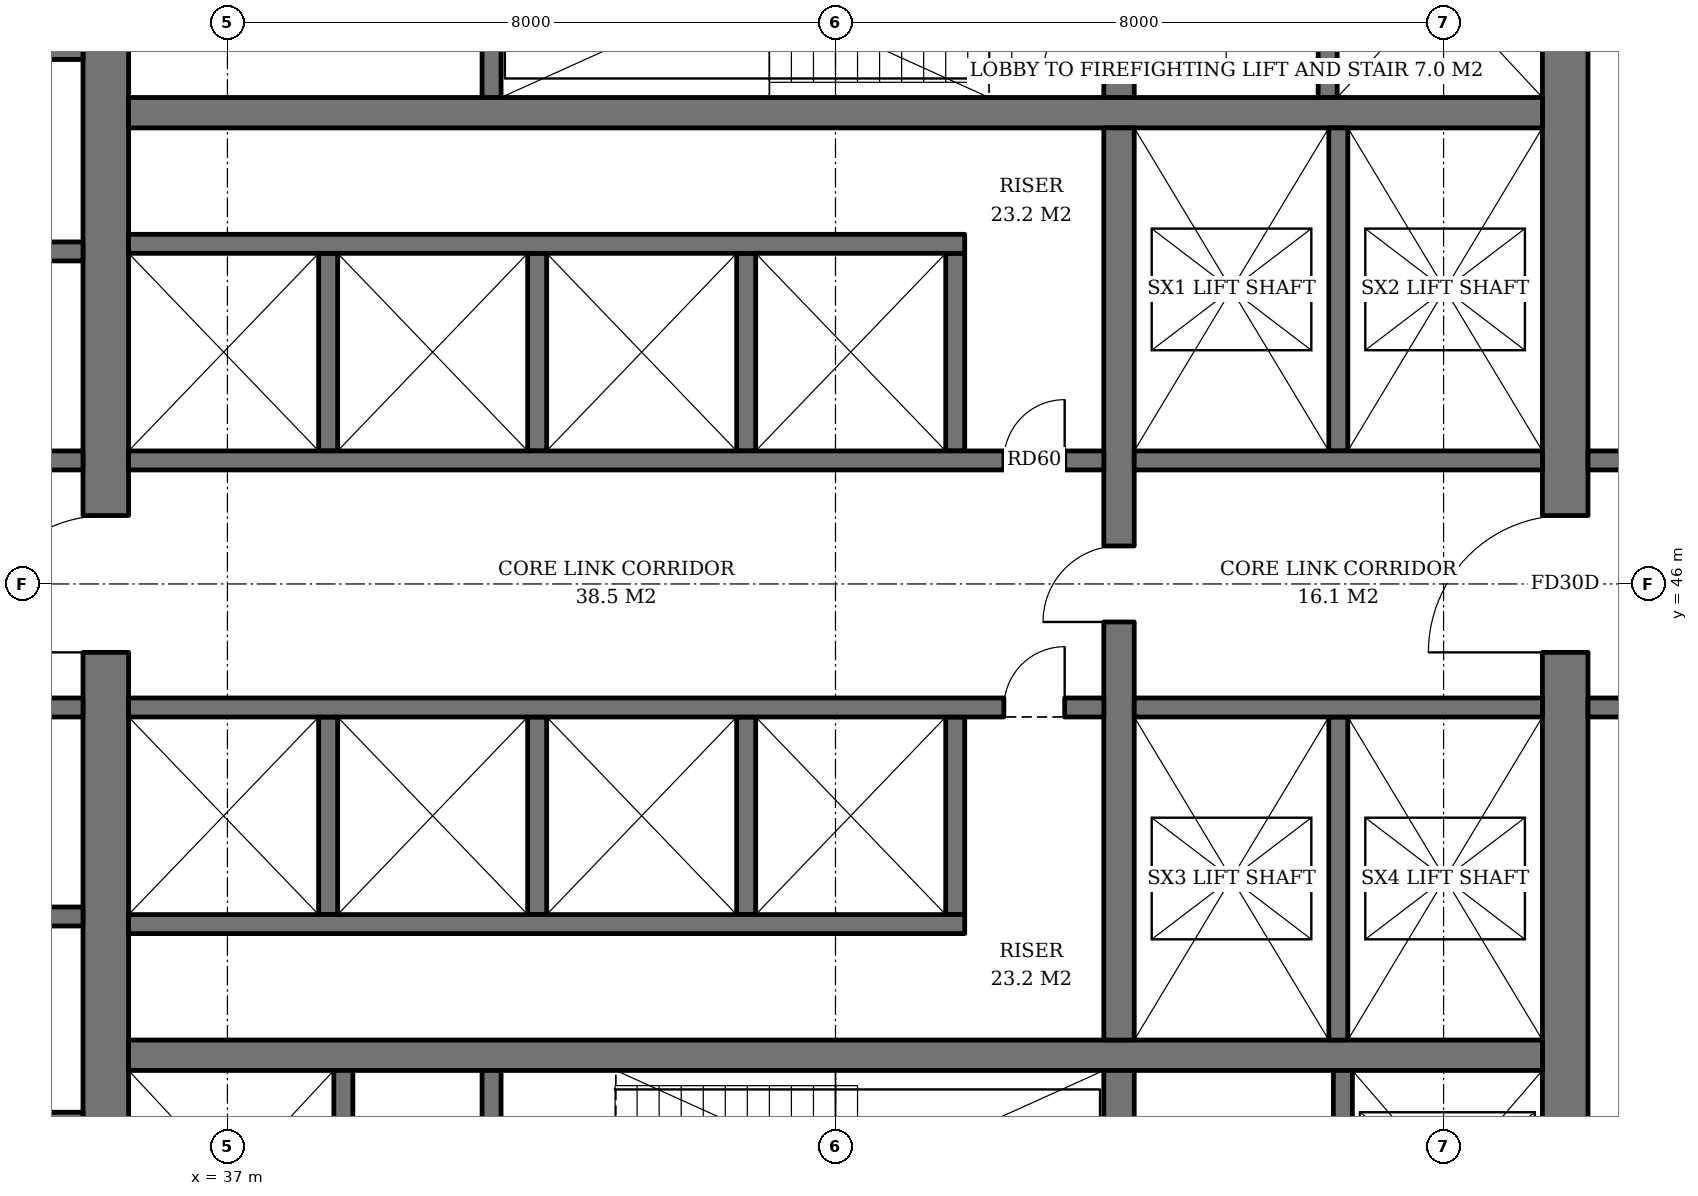
"""IFC4 building model, lengths in metres.
Left out: names, types, materials, properties, quantities, classifications, styles, units other than length and angle.
Written with IfcOpenShell. Run it as: python <this file> out.ifc"""

import sys

from ifc_helpers import new_model, si_unit, direction, frame, frame_2d, origin, place, context, subcontext, project, spatial, rectangle, extrude, element, fill, save


model = new_model("IFC4")
c1 = context("Model", 3, precision=1e-05, world=origin(), true_north=direction((0.0, 1.0)))
c2 = subcontext(c1, "Body", "Model", "MODEL_VIEW")
j1 = project(units=[si_unit("LENGTHUNIT", "METRE"), si_unit("PLANEANGLEUNIT", "RADIAN")], contexts=[c1])
p1 = place(None, origin())
s1 = spatial("IfcSite", under=j1, at=p1, CompositionType="ELEMENT")
p2 = place(p1, origin())
s2 = spatial("IfcBuilding", under=s1, at=p2, CompositionType="ELEMENT")
p3 = place(p2, frame((0.0, 0.0, 157.8)))
s3 = spatial("IfcBuildingStorey", under=s2, at=p3, CompositionType="ELEMENT", Elevation=157.8)
p4 = place(p3, frame((35.4, 36.7, 0.0), z_axis=(0.0, 0.0, 1.0), x_axis=(0.0, 1.0, 0.0)))
e1 = element("IfcWall", 1, at=p4, inside=s3, PredefinedType="SHEAR", context=c2, shape_type="SweptSolid", body=[
    extrude(rectangle(XDim=18.6, YDim=0.6, at=frame_2d((9.3, 0.0))), origin(), (0.0, 0.0, 1.0), 3.8),
])
p5 = place(p4, frame((8.4, 0.0, 0.0)))
e2 = element("IfcOpeningElement", 2, at=p5, cuts=e1, PredefinedType="OPENING", context=c2, shape_type="SweptSolid", body=[
    extrude(rectangle(XDim=1.8, YDim=2.4, at=frame_2d((0.9, 1.2))), frame((0.0, 0.31, 0.0), z_axis=(0.0, -1.0, 0.0), x_axis=(1.0, 0.0, 0.0)), (0.0, 0.0, 1.0), 0.62),
])
p6 = place(p3, frame((54.6, 36.7, 0.0), z_axis=(0.0, 0.0, 1.0), x_axis=(0.0, 1.0, 0.0)))
e3 = element("IfcWall", 3, at=p6, inside=s3, PredefinedType="SHEAR", context=c2, shape_type="SweptSolid", body=[
    extrude(rectangle(XDim=18.6, YDim=0.6, at=frame_2d((9.3, 0.0))), origin(), (0.0, 0.0, 1.0), 3.8),
])
p7 = place(p6, frame((8.4, 0.0, 0.0)))
e4 = element("IfcOpeningElement", 4, at=p7, cuts=e3, PredefinedType="OPENING", context=c2, shape_type="SweptSolid", body=[
    extrude(rectangle(XDim=1.8, YDim=2.4, at=frame_2d((0.9, 1.2))), frame((0.0, 0.31, 0.0), z_axis=(0.0, -1.0, 0.0), x_axis=(1.0, 0.0, 0.0)), (0.0, 0.0, 1.0), 0.62),
])
for number, where, z_axis, x_axis in (
    (5, (35.7, 39.8, 0.0), (0.0, 0.0, 1.0), (1.0, 0.0, 0.0)),
    (6, (35.7, 52.2, 0.0), (0.0, 0.0, 1.0), (1.0, 0.0, 0.0)),
):
    element("IfcWall", number, at=place(p3, frame(where, z_axis=z_axis, x_axis=x_axis)), inside=s3, PredefinedType="SHEAR", context=c2, shape_type="SweptSolid", body=[
        extrude(rectangle(XDim=18.6, YDim=0.4, at=frame_2d((9.3, 0.0))), origin(), (0.0, 0.0, 1.0), 3.8),
    ])
p8 = place(p3, frame((48.73, 36.7, 0.0), z_axis=(0.0, 0.0, 1.0), x_axis=(0.0, 1.0, 0.0)))
e7 = element("IfcWall", 7, at=p8, inside=s3, PredefinedType="SHEAR", context=c2, shape_type="SweptSolid", body=[
    extrude(rectangle(XDim=2.9, YDim=0.4, at=frame_2d((1.45, 0.0))), origin(), (0.0, 0.0, 1.0), 3.8),
])
p9 = place(p3, frame((48.73, 40.0, 0.0), z_axis=(0.0, 0.0, 1.0), x_axis=(0.0, 1.0, 0.0)))
e8 = element("IfcWall", 8, at=p9, inside=s3, PredefinedType="SHEAR", context=c2, shape_type="SweptSolid", body=[
    extrude(rectangle(XDim=12.0, YDim=0.4, at=frame_2d((6.0, 0.0))), origin(), (0.0, 0.0, 1.0), 3.8),
])
p10 = place(p9, frame((5.5, 0.0, 0.0)))
e9 = element("IfcOpeningElement", 9, at=p10, cuts=e8, PredefinedType="OPENING", context=c2, shape_type="SweptSolid", body=[
    extrude(rectangle(XDim=1.0, YDim=2.1, at=frame_2d((0.5, 1.05))), frame((0.0, 0.21, 0.0), z_axis=(0.0, -1.0, 0.0), x_axis=(1.0, 0.0, 0.0)), (0.0, 0.0, 1.0), 0.42),
])
p11 = place(p3, frame((48.73, 52.4, 0.0), z_axis=(0.0, 0.0, 1.0), x_axis=(0.0, 1.0, 0.0)))
e10 = element("IfcWall", 10, at=p11, inside=s3, PredefinedType="SHEAR", context=c2, shape_type="SweptSolid", body=[
    extrude(rectangle(XDim=2.9, YDim=0.4, at=frame_2d((1.45, 0.0))), origin(), (0.0, 0.0, 1.0), 3.8),
])
p12 = place(p11, frame((0.3, 0.0, 0.0)))
e11 = element("IfcOpeningElement", 11, at=p12, cuts=e10, PredefinedType="OPENING", context=c2, shape_type="SweptSolid", body=[
    extrude(rectangle(XDim=1.0, YDim=2.1, at=frame_2d((0.5, 1.05))), frame((0.0, 0.21, 0.0), z_axis=(0.0, -1.0, 0.0), x_axis=(1.0, 0.0, 0.0)), (0.0, 0.0, 1.0), 0.42),
])
p13 = place(p3, frame((38.525, 36.7, 0.0), z_axis=(0.0, 0.0, 1.0), x_axis=(0.0, 1.0, 0.0)))
e12 = element("IfcWall", 12, at=p13, inside=s3, PredefinedType="SHEAR", context=c2, shape_type="SweptSolid", body=[
    extrude(rectangle(XDim=2.9, YDim=0.25, at=frame_2d((1.45, 0.0))), origin(), (0.0, 0.0, 1.0), 3.8),
])
p14 = place(p13, frame((0.8, 0.0, 0.0)))
e13 = element("IfcOpeningElement", 13, at=p14, cuts=e12, PredefinedType="OPENING", context=c2, shape_type="SweptSolid", body=[
    extrude(rectangle(XDim=1.3, YDim=2.2, at=frame_2d((0.65, 1.1))), frame((0.0, 0.135, 0.0), z_axis=(0.0, -1.0, 0.0), x_axis=(1.0, 0.0, 0.0)), (0.0, 0.0, 1.0), 0.27),
])
p15 = place(p3, frame((40.475, 36.7, 0.0), z_axis=(0.0, 0.0, 1.0), x_axis=(0.0, 1.0, 0.0)))
e14 = element("IfcWall", 14, at=p15, inside=s3, PredefinedType="SHEAR", context=c2, shape_type="SweptSolid", body=[
    extrude(rectangle(XDim=2.9, YDim=0.25, at=frame_2d((1.45, 0.0))), origin(), (0.0, 0.0, 1.0), 3.8),
])
p16 = place(p15, frame((0.75, 0.0, 0.0)))
e15 = element("IfcOpeningElement", 15, at=p16, cuts=e14, PredefinedType="OPENING", context=c2, shape_type="SweptSolid", body=[
    extrude(rectangle(XDim=1.2, YDim=2.1, at=frame_2d((0.6, 1.05))), frame((0.0, 0.135, 0.0), z_axis=(0.0, -1.0, 0.0), x_axis=(1.0, 0.0, 0.0)), (0.0, 0.0, 1.0), 0.27),
])
p17 = place(p3, frame((51.675, 36.7, 0.0), z_axis=(0.0, 0.0, 1.0), x_axis=(0.0, 1.0, 0.0)))
e16 = element("IfcWall", 16, at=p17, inside=s3, PredefinedType="SHEAR", context=c2, shape_type="SweptSolid", body=[
    extrude(rectangle(XDim=2.9, YDim=0.25, at=frame_2d((1.45, 0.0))), origin(), (0.0, 0.0, 1.0), 3.8),
])
p18 = place(p17, frame((0.75, 0.0, 0.0)))
e17 = element("IfcOpeningElement", 17, at=p18, cuts=e16, PredefinedType="OPENING", context=c2, shape_type="SweptSolid", body=[
    extrude(rectangle(XDim=1.4, YDim=2.4, at=frame_2d((0.7, 1.2))), frame((0.0, 0.135, 0.0), z_axis=(0.0, -1.0, 0.0), x_axis=(1.0, 0.0, 0.0)), (0.0, 0.0, 1.0), 0.27),
])
p19 = place(p3, frame((40.475, 52.4, 0.0), z_axis=(0.0, 0.0, 1.0), x_axis=(0.0, 1.0, 0.0)))
e18 = element("IfcWall", 18, at=p19, inside=s3, PredefinedType="SHEAR", context=c2, shape_type="SweptSolid", body=[
    extrude(rectangle(XDim=2.9, YDim=0.25, at=frame_2d((1.45, 0.0))), origin(), (0.0, 0.0, 1.0), 3.8),
])
p20 = place(p3, frame((51.475, 52.4, 0.0), z_axis=(0.0, 0.0, 1.0), x_axis=(0.0, 1.0, 0.0)))
e19 = element("IfcWall", 19, at=p20, inside=s3, PredefinedType="SHEAR", context=c2, shape_type="SweptSolid", body=[
    extrude(rectangle(XDim=2.9, YDim=0.25, at=frame_2d((1.45, 0.0))), origin(), (0.0, 0.0, 1.0), 3.8),
])
p21 = place(p20, frame((0.8, 0.0, 0.0)))
e20 = element("IfcOpeningElement", 20, at=p21, cuts=e19, PredefinedType="OPENING", context=c2, shape_type="SweptSolid", body=[
    extrude(rectangle(XDim=1.3, YDim=2.2, at=frame_2d((0.65, 1.1))), frame((0.0, 0.135, 0.0), z_axis=(0.0, -1.0, 0.0), x_axis=(1.0, 0.0, 0.0)), (0.0, 0.0, 1.0), 0.27),
])
for number, where, z_axis, x_axis in (
    (21, (38.325, 47.75, 0.0), (0.0, 0.0, 1.0), (0.0, 1.0, 0.0)),
    (22, (41.075, 47.75, 0.0), (0.0, 0.0, 1.0), (0.0, 1.0, 0.0)),
    (23, (43.825, 47.75, 0.0), (0.0, 0.0, 1.0), (0.0, 1.0, 0.0)),
    (24, (46.575, 47.75, 0.0), (0.0, 0.0, 1.0), (0.0, 1.0, 0.0)),
):
    element("IfcWall", number, at=place(p3, frame(where, z_axis=z_axis, x_axis=x_axis)), inside=s3, PredefinedType="SHEAR", context=c2, shape_type="SweptSolid", body=[
        extrude(rectangle(XDim=2.6, YDim=0.25, at=frame_2d((1.3, 0.0))), origin(), (0.0, 0.0, 1.0), 3.8),
    ])
p22 = place(p3, frame((35.7, 50.475, 0.0), z_axis=(0.0, 0.0, 1.0), x_axis=(1.0, 0.0, 0.0)))
e25 = element("IfcWall", 25, at=p22, inside=s3, PredefinedType="SHEAR", context=c2, shape_type="SweptSolid", body=[
    extrude(rectangle(XDim=11.0, YDim=0.25, at=frame_2d((5.5, 0.0))), origin(), (0.0, 0.0, 1.0), 3.8),
])
p23 = place(p3, frame((35.7, 47.625, 0.0), z_axis=(0.0, 0.0, 1.0), x_axis=(1.0, 0.0, 0.0)))
e26 = element("IfcWall", 26, at=p23, inside=s3, PredefinedType="SHEAR", context=c2, shape_type="SweptSolid", body=[
    extrude(rectangle(XDim=12.83, YDim=0.25, at=frame_2d((6.415, 0.0))), origin(), (0.0, 0.0, 1.0), 3.8),
])
p24 = place(p23, frame((11.515, 0.0, 0.0)))
e27 = element("IfcOpeningElement", 27, at=p24, cuts=e26, PredefinedType="OPENING", context=c2, shape_type="SweptSolid", body=[
    extrude(rectangle(XDim=0.8, YDim=2.0, at=frame_2d((0.4, 1.0))), frame((0.0, 0.135, 0.0), z_axis=(0.0, -1.0, 0.0), x_axis=(1.0, 0.0, 0.0)), (0.0, 0.0, 1.0), 0.27),
])
for number, where, z_axis, x_axis in (
    (28, (38.325, 44.25, 0.0), (0.0, 0.0, 1.0), (0.0, -1.0, 0.0)),
    (29, (41.075, 44.25, 0.0), (0.0, 0.0, 1.0), (0.0, -1.0, 0.0)),
    (30, (43.825, 44.25, 0.0), (0.0, 0.0, 1.0), (0.0, -1.0, 0.0)),
    (31, (46.575, 44.25, 0.0), (0.0, 0.0, 1.0), (0.0, -1.0, 0.0)),
):
    element("IfcWall", number, at=place(p3, frame(where, z_axis=z_axis, x_axis=x_axis)), inside=s3, PredefinedType="SHEAR", context=c2, shape_type="SweptSolid", body=[
        extrude(rectangle(XDim=2.6, YDim=0.25, at=frame_2d((1.3, 0.0))), origin(), (0.0, 0.0, 1.0), 3.8),
    ])
p25 = place(p3, frame((35.7, 41.525, 0.0), z_axis=(0.0, 0.0, 1.0), x_axis=(1.0, 0.0, 0.0)))
e32 = element("IfcWall", 32, at=p25, inside=s3, PredefinedType="SHEAR", context=c2, shape_type="SweptSolid", body=[
    extrude(rectangle(XDim=11.0, YDim=0.25, at=frame_2d((5.5, 0.0))), origin(), (0.0, 0.0, 1.0), 3.8),
])
p26 = place(p3, frame((35.7, 44.375, 0.0), z_axis=(0.0, 0.0, 1.0), x_axis=(1.0, 0.0, 0.0)))
e33 = element("IfcWall", 33, at=p26, inside=s3, PredefinedType="SHEAR", context=c2, shape_type="SweptSolid", body=[
    extrude(rectangle(XDim=12.83, YDim=0.25, at=frame_2d((6.415, 0.0))), origin(), (0.0, 0.0, 1.0), 3.8),
])
p27 = place(p26, frame((11.515, 0.0, 0.0)))
e34 = element("IfcOpeningElement", 34, at=p27, cuts=e33, PredefinedType="OPENING", context=c2, shape_type="SweptSolid", body=[
    extrude(rectangle(XDim=0.8, YDim=2.0, at=frame_2d((0.4, 1.0))), frame((0.0, 0.135, 0.0), z_axis=(0.0, -1.0, 0.0), x_axis=(1.0, 0.0, 0.0)), (0.0, 0.0, 1.0), 0.27),
])
p28 = place(p3, frame((51.615, 47.75, 0.0), z_axis=(0.0, 0.0, 1.0), x_axis=(0.0, 1.0, 0.0)))
e35 = element("IfcWall", 35, at=p28, inside=s3, PredefinedType="SHEAR", context=c2, shape_type="SweptSolid", body=[
    extrude(rectangle(XDim=4.25, YDim=0.25, at=frame_2d((2.125, 0.0))), origin(), (0.0, 0.0, 1.0), 3.8),
])
p29 = place(p3, frame((48.93, 47.625, 0.0), z_axis=(0.0, 0.0, 1.0), x_axis=(1.0, 0.0, 0.0)))
e36 = element("IfcWall", 36, at=p29, inside=s3, PredefinedType="SHEAR", context=c2, shape_type="SweptSolid", body=[
    extrude(rectangle(XDim=5.37, YDim=0.25, at=frame_2d((2.685, 0.0))), origin(), (0.0, 0.0, 1.0), 3.8),
])
p30 = place(p3, frame((51.615, 44.25, 0.0), z_axis=(0.0, 0.0, 1.0), x_axis=(0.0, -1.0, 0.0)))
e37 = element("IfcWall", 37, at=p30, inside=s3, PredefinedType="SHEAR", context=c2, shape_type="SweptSolid", body=[
    extrude(rectangle(XDim=4.25, YDim=0.25, at=frame_2d((2.125, 0.0))), origin(), (0.0, 0.0, 1.0), 3.8),
])
p31 = place(p3, frame((48.93, 44.375, 0.0), z_axis=(0.0, 0.0, 1.0), x_axis=(1.0, 0.0, 0.0)))
e38 = element("IfcWall", 38, at=p31, inside=s3, PredefinedType="SHEAR", context=c2, shape_type="SweptSolid", body=[
    extrude(rectangle(XDim=5.37, YDim=0.25, at=frame_2d((2.685, 0.0))), origin(), (0.0, 0.0, 1.0), 3.8),
])
p32 = place(p3, frame((32.4, 38.875, 0.0), z_axis=(0.0, 0.0, 1.0), x_axis=(1.0, 0.0, 0.0)))
e39 = element("IfcWall", 39, at=p32, inside=s3, PredefinedType="SHEAR", context=c2, shape_type="SweptSolid", body=[
    extrude(rectangle(XDim=2.7, YDim=0.35, at=frame_2d((1.35, 0.0))), origin(), (0.0, 0.0, 1.0), 3.8),
])
for number, where, z_axis, x_axis in (
    (40, (32.4, 41.625, 0.0), (0.0, 0.0, 1.0), (1.0, 0.0, 0.0)),
    (41, (32.4, 44.375, 0.0), (0.0, 0.0, 1.0), (1.0, 0.0, 0.0)),
    (42, (32.4, 47.625, 0.0), (0.0, 0.0, 1.0), (1.0, 0.0, 0.0)),
    (43, (32.4, 50.375, 0.0), (0.0, 0.0, 1.0), (1.0, 0.0, 0.0)),
):
    element("IfcWall", number, at=place(p3, frame(where, z_axis=z_axis, x_axis=x_axis)), inside=s3, PredefinedType="SHEAR", context=c2, shape_type="SweptSolid", body=[
        extrude(rectangle(XDim=2.7, YDim=0.25, at=frame_2d((1.35, 0.0))), origin(), (0.0, 0.0, 1.0), 3.8),
    ])
p33 = place(p3, frame((32.4, 53.075, 0.0), z_axis=(0.0, 0.0, 1.0), x_axis=(1.0, 0.0, 0.0)))
e44 = element("IfcWall", 44, at=p33, inside=s3, PredefinedType="SHEAR", context=c2, shape_type="SweptSolid", body=[
    extrude(rectangle(XDim=2.7, YDim=0.35, at=frame_2d((1.35, 0.0))), origin(), (0.0, 0.0, 1.0), 3.8),
])
p34 = place(p3, frame((54.9, 44.375, 0.0), z_axis=(0.0, 0.0, 1.0), x_axis=(1.0, 0.0, 0.0)))
e45 = element("IfcWall", 45, at=p34, inside=s3, PredefinedType="SOLIDWALL", context=c2, shape_type="SweptSolid", body=[
    extrude(rectangle(XDim=2.7, YDim=0.25, at=frame_2d((1.35, 0.0))), origin(), (0.0, 0.0, 1.0), 3.52),
])
p35 = place(p34, frame((0.85, 0.0, 0.0)))
e46 = element("IfcOpeningElement", 46, at=p35, cuts=e45, PredefinedType="OPENING", context=c2, shape_type="SweptSolid", body=[
    extrude(rectangle(XDim=1.0, YDim=2.1, at=frame_2d((0.5, 1.05))), frame((0.0, 0.135, 0.0), z_axis=(0.0, -1.0, 0.0), x_axis=(1.0, 0.0, 0.0)), (0.0, 0.0, 1.0), 0.27),
])
p36 = place(p3, frame((54.9, 47.625, 0.0), z_axis=(0.0, 0.0, 1.0), x_axis=(1.0, 0.0, 0.0)))
e47 = element("IfcWall", 47, at=p36, inside=s3, PredefinedType="SOLIDWALL", context=c2, shape_type="SweptSolid", body=[
    extrude(rectangle(XDim=2.7, YDim=0.25, at=frame_2d((1.35, 0.0))), origin(), (0.0, 0.0, 1.0), 3.52),
])
p37 = place(p36, frame((0.85, 0.0, 0.0)))
e48 = element("IfcOpeningElement", 48, at=p37, cuts=e47, PredefinedType="OPENING", context=c2, shape_type="SweptSolid", body=[
    extrude(rectangle(XDim=1.0, YDim=2.1, at=frame_2d((0.5, 1.05))), frame((0.0, 0.135, 0.0), z_axis=(0.0, -1.0, 0.0), x_axis=(1.0, 0.0, 0.0)), (0.0, 0.0, 1.0), 0.27),
])
p38 = place(p24, origin())
e49 = element("IfcDoor", 49, at=p38, inside=s3, OperationType="SINGLE_SWING_RIGHT", PredefinedType="DOOR", context=c2, shape_type="SweptSolid", body=[
    extrude(rectangle(XDim=0.8, YDim=2.0, at=frame_2d((0.4, 1.0))), frame((0.0, 0.025, 0.0), z_axis=(0.0, -1.0, 0.0), x_axis=(1.0, 0.0, 0.0)), (0.0, 0.0, 1.0), 0.05),
])
fill(e27, e49)
p39 = place(p27, origin())
e50 = element("IfcDoor", 50, at=p39, inside=s3, OperationType="SINGLE_SWING_RIGHT", PredefinedType="DOOR", context=c2, shape_type="SweptSolid", body=[
    extrude(rectangle(XDim=0.8, YDim=2.0, at=frame_2d((0.4, 1.0))), frame((0.0, 0.025, 0.0), z_axis=(0.0, -1.0, 0.0), x_axis=(1.0, 0.0, 0.0)), (0.0, 0.0, 1.0), 0.05),
])
fill(e34, e50)
p40 = place(p10, origin())
e51 = element("IfcDoor", 51, at=p40, inside=s3, OperationType="SINGLE_SWING_LEFT", PredefinedType="DOOR", context=c2, shape_type="SweptSolid", body=[
    extrude(rectangle(XDim=1.0, YDim=2.1, at=frame_2d((0.5, 1.05))), frame((0.0, 0.025, 0.0), z_axis=(0.0, -1.0, 0.0), x_axis=(1.0, 0.0, 0.0)), (0.0, 0.0, 1.0), 0.05),
])
fill(e9, e51)
p41 = place(p12, origin())
e52 = element("IfcDoor", 52, at=p41, inside=s3, OperationType="SINGLE_SWING_LEFT", PredefinedType="DOOR", context=c2, shape_type="SweptSolid", body=[
    extrude(rectangle(XDim=1.0, YDim=2.1, at=frame_2d((0.5, 1.05))), frame((0.0, 0.025, 0.0), z_axis=(0.0, -1.0, 0.0), x_axis=(1.0, 0.0, 0.0)), (0.0, 0.0, 1.0), 0.05),
])
fill(e11, e52)
p42 = place(p5, origin())
e53 = element("IfcDoor", 53, at=p42, inside=s3, OperationType="DOUBLE_DOOR_SINGLE_SWING", PredefinedType="DOOR", context=c2, shape_type="SweptSolid", body=[
    extrude(rectangle(XDim=1.8, YDim=2.4, at=frame_2d((0.9, 1.2))), frame((0.0, 0.025, 0.0), z_axis=(0.0, -1.0, 0.0), x_axis=(1.0, 0.0, 0.0)), (0.0, 0.0, 1.0), 0.05),
])
fill(e2, e53)
p43 = place(p7, origin())
e54 = element("IfcDoor", 54, at=p43, inside=s3, OperationType="DOUBLE_DOOR_SINGLE_SWING", PredefinedType="DOOR", context=c2, shape_type="SweptSolid", body=[
    extrude(rectangle(XDim=1.8, YDim=2.4, at=frame_2d((0.9, 1.2))), frame((0.0, 0.025, 0.0), z_axis=(0.0, -1.0, 0.0), x_axis=(1.0, 0.0, 0.0)), (0.0, 0.0, 1.0), 0.05),
])
fill(e4, e54)
save(model, sys.argv[1])
